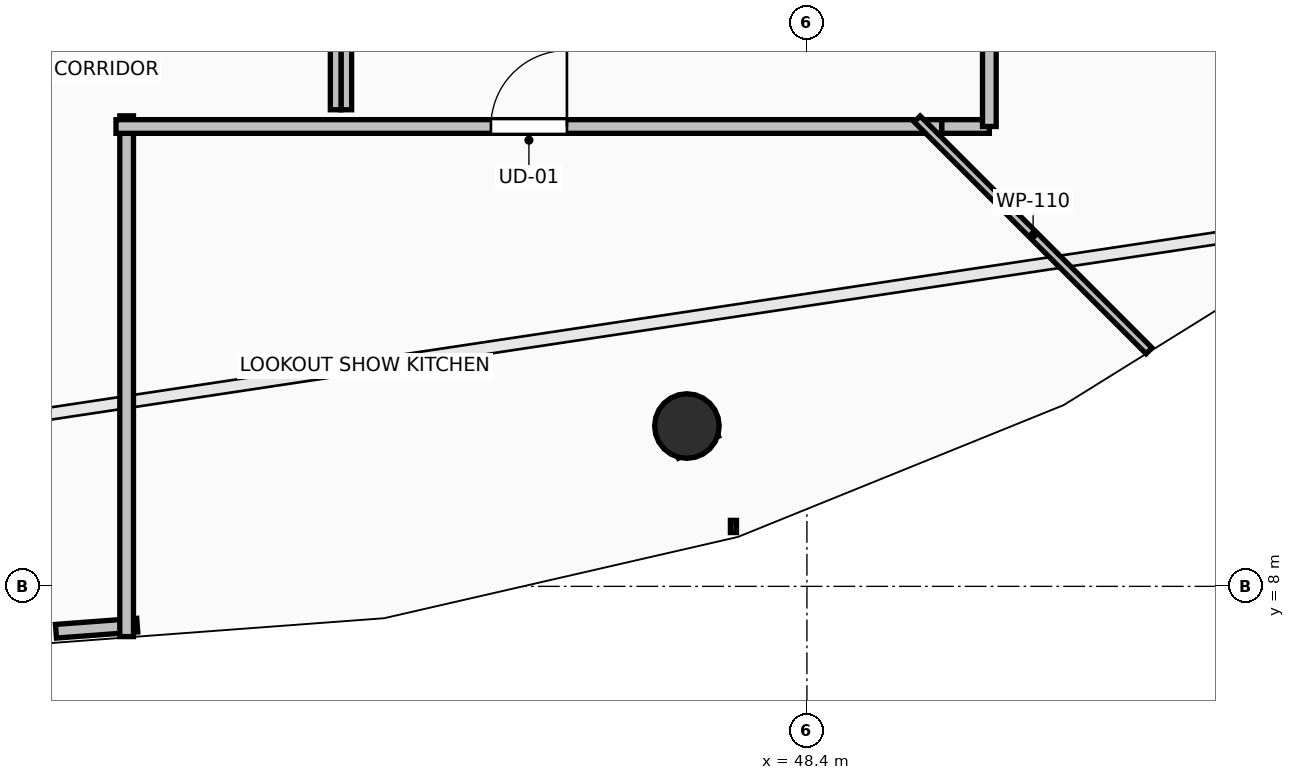
"""IFC4 building model, lengths in metres.
Left out: names, types, materials, properties, quantities, classifications, styles, units other than length and angle.
Written with IfcOpenShell. Run it as: python <this file> out.ifc"""

import sys

from ifc_helpers import new_model, si_unit, direction, frame, frame_2d, origin, origin_2d, place, context, subcontext, project, spatial, rectangle, circle, extrude, element, fill, save


model = new_model("IFC4")
c1 = context("Model", 3, precision=1e-05, world=origin(), true_north=direction((0.0, 1.0)))
c2 = subcontext(c1, "Body", "Model", "MODEL_VIEW")
j1 = project(units=[si_unit("LENGTHUNIT", "METRE"), si_unit("PLANEANGLEUNIT", "RADIAN")], contexts=[c1])
p1 = place(None, origin())
s1 = spatial("IfcSite", under=j1, at=p1, CompositionType="ELEMENT")
p2 = place(p1, origin())
s2 = spatial("IfcBuilding", under=s1, at=p2, CompositionType="ELEMENT")
p3 = place(p2, frame((0.0, 0.0, 290.4)))
s3 = spatial("IfcBuildingStorey", under=s2, at=p3, CompositionType="ELEMENT", Elevation=290.4)
p4 = place(p3, frame((46.821, 10.109, 0.0), z_axis=(0.0, 0.0, 1.0), x_axis=(0.382683432365, -0.923879532511, 0.0)))
e1 = element("IfcColumn", 1, at=p4, inside=s3, PredefinedType="COLUMN", context=c2, shape_type="SweptSolid", body=[
    extrude(circle(Radius=0.425, at=origin_2d()), origin(), (0.0, 0.0, 1.0), 5.0),
])
p5 = place(p3, frame((38.521, 7.41, 0.0), z_axis=(0.0, 0.0, 1.0), x_axis=(0.997223460029, 0.074467246273, 0.0)))
e2 = element("IfcWall", 2, at=p5, inside=s3, PredefinedType="PARTITIONING", context=c2, shape_type="SweptSolid", body=[
    extrude(rectangle(XDim=1.072, YDim=0.18, at=frame_2d((0.536, 0.0))), origin(), (0.0, 0.0, 1.0), 4.72),
])
p6 = place(p3, frame((39.45, 7.339, 0.0), z_axis=(0.0, 0.0, 1.0), x_axis=(0.0, 1.0, 0.0)))
e3 = element("IfcWall", 3, at=p6, inside=s3, PredefinedType="PARTITIONING", context=c2, shape_type="SweptSolid", body=[
    extrude(rectangle(XDim=6.851, YDim=0.18, at=frame_2d((3.425, 0.0))), origin(), (0.0, 0.0, 1.0), 3.912),
])
p7 = place(p3, frame((39.31, 14.05, 0.0), z_axis=(0.0, 0.0, 1.0), x_axis=(1.0, 0.0, 0.0)))
e4 = element("IfcWall", 4, at=p7, inside=s3, PredefinedType="PARTITIONING", context=c2, shape_type="SweptSolid", body=[
    extrude(rectangle(XDim=10.865, YDim=0.18, at=frame_2d((5.433, 0.0))), origin(), (0.0, 0.0, 1.0), 3.912),
])
p8 = place(p7, frame((4.933, 0.0, 0.0)))
e5 = element("IfcOpeningElement", 5, at=p8, cuts=e4, PredefinedType="OPENING", context=c2, shape_type="SweptSolid", body=[
    extrude(rectangle(XDim=1.0, YDim=2.15, at=frame_2d((0.5, 1.075))), frame((0.0, 0.105, 0.0), z_axis=(0.0, -1.0, 0.0), x_axis=(1.0, 0.0, 0.0)), (0.0, 0.0, 1.0), 0.21),
])
p9 = place(p3, frame((50.175, 14.05, 0.0), z_axis=(0.0, 0.0, 1.0), x_axis=(1.0, 0.0, 0.0)))
e6 = element("IfcWall", 6, at=p9, inside=s3, PredefinedType="PARTITIONING", context=c2, shape_type="SweptSolid", body=[
    extrude(rectangle(XDim=0.625, YDim=0.18, at=frame_2d((0.312, 0.0))), origin(), (0.0, 0.0, 1.0), 4.409),
])
p10 = place(p3, frame((50.8, 14.05, 0.0), z_axis=(0.0, 0.0, 1.0), x_axis=(0.0, 1.0, 0.0)))
e7 = element("IfcWall", 7, at=p10, inside=s3, PredefinedType="PARTITIONING", context=c2, shape_type="SweptSolid", body=[
    extrude(rectangle(XDim=11.89, YDim=0.18, at=frame_2d((5.945, 0.0))), origin(), (0.0, 0.0, 1.0), 3.912),
])
p11 = place(p10, frame((5.445, 0.0, 0.0)))
e8 = element("IfcOpeningElement", 8, at=p11, cuts=e7, PredefinedType="OPENING", context=c2, shape_type="SweptSolid", body=[
    extrude(rectangle(XDim=1.0, YDim=2.15, at=frame_2d((0.5, 1.075))), frame((0.0, 0.105, 0.0), z_axis=(0.0, -1.0, 0.0), x_axis=(1.0, 0.0, 0.0)), (0.0, 0.0, 1.0), 0.21),
])
p12 = place(p3, frame((52.901, 11.099, 0.0), z_axis=(0.0, 0.0, 1.0), x_axis=(-0.707106781187, 0.707106781187, 0.0)))
e9 = element("IfcWall", 9, at=p12, inside=s3, PredefinedType="PARTITIONING", context=c2, shape_type="SweptSolid", body=[
    extrude(rectangle(XDim=4.313, YDim=0.11, at=frame_2d((2.156, 0.0))), origin(), (0.0, 0.0, 1.0), 4.304),
])
for number, where, z_axis, x_axis in (
    (10, (42.34, 14.27, 0.0), (0.0, 0.0, 1.0), (0.0, 1.0, 0.0)),
    (11, (42.2, 16.1, 0.0), (0.0, 0.0, 1.0), (0.0, -1.0, 0.0)),
):
    element("IfcWall", number, at=place(p3, frame(where, z_axis=z_axis, x_axis=x_axis)), inside=s3, PredefinedType="PARTITIONING", context=c2, shape_type="SweptSolid", body=[
        extrude(rectangle(XDim=1.83, YDim=0.14, at=frame_2d((0.915, 0.0))), origin(), (0.0, 0.0, 1.0), 4.72),
    ])
p13 = place(p8, origin())
e12 = element("IfcDoor", 12, at=p13, inside=s3, OperationType="SINGLE_SWING_RIGHT", PredefinedType="DOOR", context=c2, shape_type="SweptSolid", body=[
    extrude(rectangle(XDim=1.0, YDim=2.15, at=frame_2d((0.5, 1.075))), frame((0.0, 0.025, 0.0), z_axis=(0.0, -1.0, 0.0), x_axis=(1.0, 0.0, 0.0)), (0.0, 0.0, 1.0), 0.05),
])
fill(e5, e12)
save(model, sys.argv[1])
